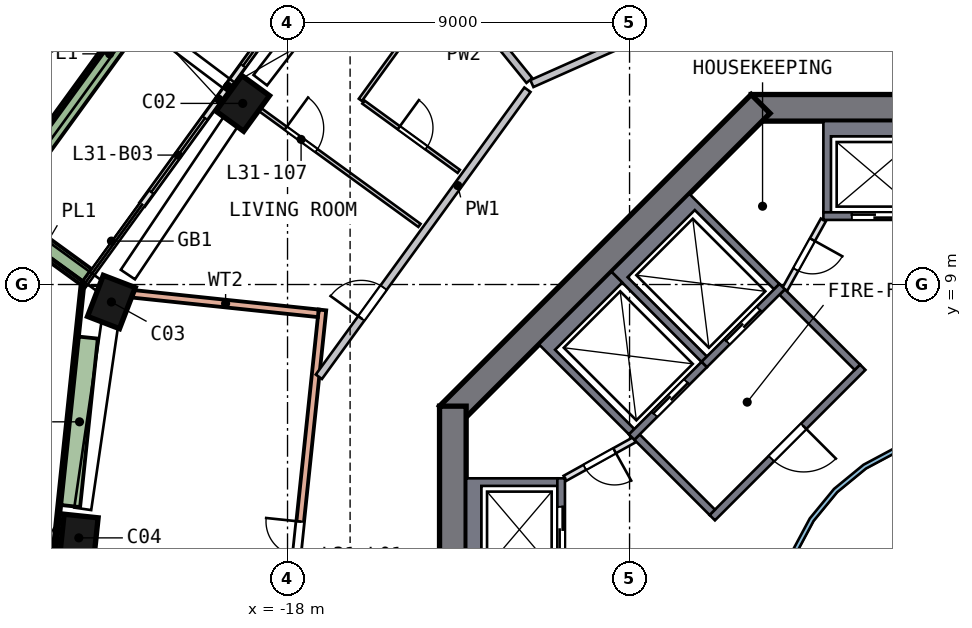
"""IFC4 building model, lengths in metres.
Left out: names, types, materials, properties, quantities, classifications, styles, units other than length and angle.
Written with IfcOpenShell. Run it as: python <this file> out.ifc"""

import sys

from ifc_helpers import new_model, si_unit, direction, frame, frame_2d, origin, origin_2d, place, context, subcontext, project, spatial, polyline, rectangle, outline, extrude, element, fill, save


model = new_model("IFC4")
c1 = context("Model", 3, precision=1e-05, world=origin(), true_north=direction((0.0, 1.0)))
c2 = subcontext(c1, "Body", "Model", "MODEL_VIEW")
j1 = project(units=[si_unit("LENGTHUNIT", "METRE"), si_unit("PLANEANGLEUNIT", "RADIAN")], contexts=[c1])
p1 = place(None, origin())
s1 = spatial("IfcSite", under=j1, at=p1, CompositionType="ELEMENT")
p2 = place(p1, origin())
s2 = spatial("IfcBuilding", under=s1, at=p2, CompositionType="ELEMENT")
p3 = place(p2, frame((0.0, 0.0, 133.0)))
s3 = spatial("IfcBuildingStorey", under=s2, at=p3, CompositionType="ELEMENT", Elevation=133.0)
p4 = place(p3, frame((-19.1, 13.877, 0.0), z_axis=(-0.065251144, -0.091412441, 0.993673012), x_axis=(-0.584148171, -0.803839453, -0.112307833)))
e1 = element("IfcColumn", 1, at=p4, inside=s3, PredefinedType="COLUMN", context=c2, shape_type="SweptSolid", body=[
    extrude(rectangle(XDim=1.15, YDim=0.9, at=origin_2d()), origin(), (0.0, 0.0, 1.0), 3.21),
])
p5 = place(p3, frame((-22.586, 8.67, 0.0), z_axis=(-0.040369992, -0.107729337, 0.993360284), x_axis=(0.356460917, 0.927200738, 0.115040884)))
e2 = element("IfcColumn", 2, at=p5, inside=s3, PredefinedType="COLUMN", context=c2, shape_type="SweptSolid", body=[
    extrude(rectangle(XDim=1.15, YDim=0.9, at=origin_2d()), origin(), (0.0, 0.0, 1.0), 3.211),
])
p6 = place(p3, frame((-23.479, 2.468, 0.0), z_axis=(-0.010799137, -0.111793887, 0.993672736), x_axis=(-0.103931825, -0.98822294, -0.112310274)))
e3 = element("IfcColumn", 3, at=p6, inside=s3, PredefinedType="COLUMN", context=c2, shape_type="SweptSolid", body=[
    extrude(rectangle(XDim=1.15, YDim=0.9, at=origin_2d()), origin(), (0.0, 0.0, 1.0), 3.21),
])
p7 = place(p3, frame((5.799, 13.65, 0.0), z_axis=(0.0, 0.0, 1.0), x_axis=(-1.0, 0.0, 0.0)))
e4 = element("IfcWall", 4, at=p7, inside=s3, PredefinedType="SHEAR", context=c2, shape_type="SweptSolid", body=[
    extrude(rectangle(XDim=11.598, YDim=0.7, at=frame_2d((5.799, 0.0))), origin(), (0.0, 0.0, 1.0), 3.5),
])
p8 = place(p7, frame((4.899, 0.0, 0.0)))
e5 = element("IfcOpeningElement", 5, at=p8, cuts=e4, PredefinedType="OPENING", context=c2, shape_type="SweptSolid", body=[
    extrude(rectangle(XDim=1.8, YDim=2.1, at=frame_2d((0.9, 1.05))), frame((0.0, 0.36, 0.0), z_axis=(0.0, -1.0, 0.0), x_axis=(1.0, 0.0, 0.0)), (0.0, 0.0, 1.0), 0.72),
])
p9 = place(p3, frame((-5.552, 13.752, 0.0), z_axis=(0.0, 0.0, 1.0), x_axis=(-0.707106781, -0.707106781, 0.0)))
e6 = element("IfcWall", 6, at=p9, inside=s3, PredefinedType="SHEAR", context=c2, shape_type="SweptSolid", body=[
    extrude(rectangle(XDim=11.598, YDim=0.7, at=frame_2d((5.799, 0.0))), origin(), (0.0, 0.0, 1.0), 3.5),
])
p10 = place(p3, frame((-13.65, 5.799, 0.0), z_axis=(0.0, 0.0, 1.0), x_axis=(0.0, -1.0, 0.0)))
e7 = element("IfcWall", 7, at=p10, inside=s3, PredefinedType="SHEAR", context=c2, shape_type="SweptSolid", body=[
    extrude(rectangle(XDim=11.598, YDim=0.7, at=frame_2d((5.799, 0.0))), origin(), (0.0, 0.0, 1.0), 3.5),
])
p11 = place(p10, frame((4.899, 0.0, 0.0)))
e8 = element("IfcOpeningElement", 8, at=p11, cuts=e7, PredefinedType="OPENING", context=c2, shape_type="SweptSolid", body=[
    extrude(rectangle(XDim=1.8, YDim=2.1, at=frame_2d((0.9, 1.05))), frame((0.0, 0.36, 0.0), z_axis=(0.0, -1.0, 0.0), x_axis=(1.0, 0.0, 0.0)), (0.0, 0.0, 1.0), 0.72),
])
p12 = place(p3, frame((-17.522, 17.026, 0.0), z_axis=(0.0, 0.0, 1.0), x_axis=(-0.587778943, -0.809021578, 0.0)))
e9 = element("IfcWall", 9, at=p12, inside=s3, PredefinedType="SOLIDWALL", context=c2, shape_type="SweptSolid", body=[
    extrude(rectangle(XDim=3.475, YDim=0.15, at=frame_2d((1.737, 0.0))), origin(), (0.0, 0.0, 1.0), 2.475),
])
p13 = place(p12, frame((0.4, 0.0, 0.0)))
e10 = element("IfcOpeningElement", 10, at=p13, cuts=e9, PredefinedType="OPENING", context=c2, shape_type="SweptSolid", body=[
    extrude(rectangle(XDim=2.4, YDim=2.4, at=frame_2d((1.2, 1.2))), frame((0.0, 0.085, 0.0), z_axis=(0.0, -1.0, 0.0), x_axis=(1.0, 0.0, 0.0)), (0.0, 0.0, 1.0), 0.17),
])
p14 = place(p3, frame((-19.565, 14.215, 0.0), z_axis=(0.0, 0.0, 1.0), x_axis=(-0.58777044, -0.809027756, 0.0)))
e11 = element("IfcWall", 11, at=p14, inside=s3, PredefinedType="SOLIDWALL", context=c2, shape_type="SweptSolid", body=[
    extrude(rectangle(XDim=3.835, YDim=0.15, at=frame_2d((1.918, 0.0))), origin(), (0.0, 0.0, 1.0), 2.475),
])
p15 = place(p14, frame((1.035, 0.0, 0.0)))
e12 = element("IfcOpeningElement", 12, at=p15, cuts=e11, PredefinedType="OPENING", context=c2, shape_type="SweptSolid", body=[
    extrude(rectangle(XDim=2.4, YDim=2.4, at=frame_2d((1.2, 1.2))), frame((0.0, 0.085, 0.0), z_axis=(0.0, -1.0, 0.0), x_axis=(1.0, 0.0, 0.0)), (0.0, 0.0, 1.0), 0.17),
])
p16 = place(p3, frame((-19.532, 19.406, 0.0), z_axis=(0.0, 0.0, 1.0), x_axis=(-0.587777543, -0.809022595, 0.0)))
e13 = element("IfcWall", 13, at=p16, inside=s3, PredefinedType="SOLIDWALL", context=c2, shape_type="SweptSolid", body=[
    extrude(rectangle(XDim=10.719, YDim=0.5, at=frame_2d((5.36, 0.0))), origin(), (0.0, 0.0, 1.0), 0.7),
])
p17 = place(p3, frame((-25.483, 10.789, 0.0), z_axis=(0.0, 0.0, 1.0), x_axis=(0.809025441, -0.587773626, 0.0)))
e14 = element("IfcWall", 14, at=p17, inside=s3, PredefinedType="SOLIDWALL", context=c2, shape_type="SweptSolid", body=[
    extrude(rectangle(XDim=2.699, YDim=0.5, at=frame_2d((1.35, 0.0))), origin(), (0.0, 0.0, 1.0), 0.7),
])
p18 = place(p3, frame((-18.44, -4.598, 0.0), z_axis=(0.0, 0.0, 1.0), x_axis=(0.104530323, 0.9945217, 0.0)))
e15 = element("IfcWall", 15, at=p18, inside=s3, PredefinedType="SOLIDWALL", context=c2, shape_type="SweptSolid", body=[
    extrude(rectangle(XDim=13.0, YDim=0.2, at=frame_2d((6.5, 0.0))), origin(), (0.0, 0.0, 1.0), 3.19),
])
p19 = place(p18, frame((5.6, 0.0, 0.0)))
e16 = element("IfcOpeningElement", 16, at=p19, cuts=e15, PredefinedType="OPENING", context=c2, shape_type="SweptSolid", body=[
    extrude(rectangle(XDim=1.8, YDim=2.4, at=frame_2d((0.9, 1.2))), frame((0.0, 0.11, 0.0), z_axis=(0.0, -1.0, 0.0), x_axis=(1.0, 0.0, 0.0)), (0.0, 0.0, 1.0), 0.22),
])
p20 = place(p3, frame((-22.068, 8.755, 0.0), z_axis=(0.0, 0.0, 1.0), x_axis=(0.994525892, -0.104490432, 0.0)))
e17 = element("IfcWall", 17, at=p20, inside=s3, PredefinedType="SOLIDWALL", context=c2, shape_type="SweptSolid", body=[
    extrude(rectangle(XDim=4.904, YDim=0.2, at=frame_2d((2.452, 0.0))), origin(), (0.0, 0.0, 1.0), 3.19),
])
p21 = place(p3, frame((-23.405, 8.915, 0.0), z_axis=(0.0, 0.0, 1.0), x_axis=(-0.104538298, -0.994520862, 0.0)))
e18 = element("IfcWall", 18, at=p21, inside=s3, PredefinedType="SOLIDWALL", context=c2, shape_type="SweptSolid", body=[
    extrude(rectangle(XDim=12.84, YDim=0.1, at=frame_2d((6.42, 0.0))), origin(), (0.0, 0.0, 1.0), 0.7),
])
p22 = place(p3, frame((-23.241, 7.603, 0.0), z_axis=(0.0, 0.0, 1.0), x_axis=(-0.1045137, -0.994523447, 0.0)))
e19 = element("IfcWall", 19, at=p22, inside=s3, PredefinedType="SOLIDWALL", context=c2, shape_type="SweptSolid", body=[
    extrude(rectangle(XDim=4.457, YDim=0.5, at=frame_2d((2.229, 0.0))), origin(), (0.0, 0.0, 1.0), 0.7),
])
p23 = place(p3, origin())
e20 = element("IfcWall", 20, at=p23, inside=s3, PredefinedType="SOLIDWALL", context=c2, shape_type="SweptSolid", body=[
    extrude(outline(polyline([(-3.9, 10.9), (-3.9, 13.3), (-1.2, 13.3), (-1.2, 10.9), (-1.4, 10.9), (-1.4, 12.9), (-3.7, 12.9), (-3.7, 10.9), (-3.9, 10.9)])), origin(), (0.0, 0.0, 1.0), 3.19),
])
p24 = place(p3, frame((-1.2, 10.8, 0.0), z_axis=(0.0, 0.0, 1.0), x_axis=(-1.0, 0.0, 0.0)))
e21 = element("IfcWall", 21, at=p24, inside=s3, PredefinedType="SOLIDWALL", context=c2, shape_type="SweptSolid", body=[
    extrude(rectangle(XDim=2.7, YDim=0.2, at=frame_2d((1.35, 0.0))), origin(), (0.0, 0.0, 1.0), 3.19),
])
p25 = place(p24, frame((0.75, 0.0, 0.0)))
e22 = element("IfcOpeningElement", 22, at=p25, cuts=e21, PredefinedType="OPENING", context=c2, shape_type="SweptSolid", body=[
    extrude(rectangle(XDim=1.2, YDim=2.1, at=frame_2d((0.6, 1.05))), frame((0.0, 0.11, 0.0), z_axis=(0.0, -1.0, 0.0), x_axis=(1.0, 0.0, 0.0)), (0.0, 0.0, 1.0), 0.22),
])
p26 = place(p3, origin())
e23 = element("IfcWall", 23, at=p26, inside=s3, PredefinedType="SOLIDWALL", context=c2, shape_type="SweptSolid", body=[
    extrude(outline(polyline([(-13.3, 3.9), (-10.9, 3.9), (-10.9, 3.7), (-12.9, 3.7), (-12.9, 1.4), (-10.9, 1.4), (-10.9, 1.2), (-13.3, 1.2), (-13.3, 3.9)])), origin(), (0.0, 0.0, 1.0), 3.19),
])
p27 = place(p3, frame((-10.8, 1.2, 0.0), z_axis=(0.0, 0.0, 1.0), x_axis=(0.0, 1.0, 0.0)))
e24 = element("IfcWall", 24, at=p27, inside=s3, PredefinedType="SOLIDWALL", context=c2, shape_type="SweptSolid", body=[
    extrude(rectangle(XDim=2.7, YDim=0.2, at=frame_2d((1.35, 0.0))), origin(), (0.0, 0.0, 1.0), 3.19),
])
p28 = place(p27, frame((0.75, 0.0, 0.0)))
e25 = element("IfcOpeningElement", 25, at=p28, cuts=e24, PredefinedType="OPENING", context=c2, shape_type="SweptSolid", body=[
    extrude(rectangle(XDim=1.2, YDim=2.1, at=frame_2d((0.6, 1.05))), frame((0.0, 0.11, 0.0), z_axis=(0.0, -1.0, 0.0), x_axis=(1.0, 0.0, 0.0)), (0.0, 0.0, 1.0), 0.22),
])
p29 = place(p3, origin())
e26 = element("IfcWall", 26, at=p29, inside=s3, PredefinedType="SOLIDWALL", context=c2, shape_type="SweptSolid", body=[
    extrude(outline(polyline([(-9.475, 9.334), (-7.425, 11.385), (-5.056, 9.016), (-5.197, 8.874), (-7.283, 10.96), (-9.051, 9.192), (-6.965, 7.106), (-7.106, 6.965), (-9.475, 9.334)])), origin(), (0.0, 0.0, 1.0), 3.19),
])
p30 = place(p3, frame((-4.985, 8.945, 0.0), z_axis=(0.0, 0.0, 1.0), x_axis=(-0.707106781, -0.707106781, 0.0)))
e27 = element("IfcWall", 27, at=p30, inside=s3, PredefinedType="SOLIDWALL", context=c2, shape_type="SweptSolid", body=[
    extrude(rectangle(XDim=2.9, YDim=0.2, at=frame_2d((1.45, 0.0))), origin(), (0.0, 0.0, 1.0), 3.19),
])
p31 = place(p30, frame((0.85, 0.0, 0.0)))
e28 = element("IfcOpeningElement", 28, at=p31, cuts=e27, PredefinedType="OPENING", context=c2, shape_type="SweptSolid", body=[
    extrude(rectangle(XDim=1.2, YDim=2.1, at=frame_2d((0.6, 1.05))), frame((0.0, 0.11, 0.0), z_axis=(0.0, -1.0, 0.0), x_axis=(1.0, 0.0, 0.0)), (0.0, 0.0, 1.0), 0.22),
])
p32 = place(p3, origin())
e29 = element("IfcWall", 29, at=p32, inside=s3, PredefinedType="SOLIDWALL", context=c2, shape_type="SweptSolid", body=[
    extrude(outline(polyline([(-11.385, 7.425), (-9.475, 9.334), (-9.192, 9.051), (-10.96, 7.283), (-8.874, 5.197), (-9.016, 5.056), (-11.385, 7.425)])), origin(), (0.0, 0.0, 1.0), 3.19),
])
p33 = place(p3, frame((-7.036, 6.894, 0.0), z_axis=(0.0, 0.0, 1.0), x_axis=(-0.707106781, -0.707106781, 0.0)))
e30 = element("IfcWall", 30, at=p33, inside=s3, PredefinedType="SOLIDWALL", context=c2, shape_type="SweptSolid", body=[
    extrude(rectangle(XDim=2.7, YDim=0.2, at=frame_2d((1.35, 0.0))), origin(), (0.0, 0.0, 1.0), 3.19),
])
p34 = place(p33, frame((0.65, 0.0, 0.0)))
e31 = element("IfcOpeningElement", 31, at=p34, cuts=e30, PredefinedType="OPENING", context=c2, shape_type="SweptSolid", body=[
    extrude(rectangle(XDim=1.2, YDim=2.1, at=frame_2d((0.6, 1.05))), frame((0.0, 0.11, 0.0), z_axis=(0.0, -1.0, 0.0), x_axis=(1.0, 0.0, 0.0)), (0.0, 0.0, 1.0), 0.22),
])
p35 = place(p3, frame((-2.864, 6.823, 0.0), z_axis=(0.0, 0.0, 1.0), x_axis=(-0.707106781, -0.707106781, 0.0)))
e32 = element("IfcWall", 32, at=p35, inside=s3, PredefinedType="SOLIDWALL", context=c2, shape_type="SweptSolid", body=[
    extrude(rectangle(XDim=5.6, YDim=0.2, at=frame_2d((2.8, 0.0))), origin(), (0.0, 0.0, 1.0), 3.19),
])
p36 = place(p35, frame((2.2, 0.0, 0.0)))
e33 = element("IfcOpeningElement", 33, at=p36, cuts=e32, PredefinedType="OPENING", context=c2, shape_type="SweptSolid", body=[
    extrude(rectangle(XDim=1.2, YDim=2.1, at=frame_2d((0.6, 1.05))), frame((0.0, 0.11, 0.0), z_axis=(0.0, -1.0, 0.0), x_axis=(1.0, 0.0, 0.0)), (0.0, 0.0, 1.0), 0.22),
])
for number, where, z_axis, x_axis in (
    (34, (-3.005, 6.823, 0.0), (0.0, 0.0, 1.0), (-0.707, 0.707, 0.0)),
    (35, (-6.823, 3.005, 0.0), (0.0, 0.0, 1.0), (-0.707, 0.707, 0.0)),
):
    element("IfcWall", number, at=place(p3, frame(where, z_axis=z_axis, x_axis=x_axis)), inside=s3, PredefinedType="SOLIDWALL", context=c2, shape_type="SweptSolid", body=[
        extrude(rectangle(XDim=2.8, YDim=0.2, at=frame_2d((1.4, 0.0))), origin(), (0.0, 0.0, 1.0), 3.19),
    ])
p37 = place(p3, frame((-3.9, 10.7, 0.0), z_axis=(0.0, 0.0, 1.0), x_axis=(-0.485692555, -0.874129705, 0.0)))
e36 = element("IfcWall", 36, at=p37, inside=s3, PredefinedType="PARTITIONING", context=c2, shape_type="SweptSolid", body=[
    extrude(rectangle(XDim=2.089, YDim=0.15, at=frame_2d((1.044, 0.0))), origin(), (0.0, 0.0, 1.0), 3.19),
])
p38 = place(p37, frame((0.594, 0.0, 0.0)))
e37 = element("IfcOpeningElement", 37, at=p38, cuts=e36, PredefinedType="OPENING", context=c2, shape_type="SweptSolid", body=[
    extrude(rectangle(XDim=0.9, YDim=2.1, at=frame_2d((0.45, 1.05))), frame((0.0, 0.085, 0.0), z_axis=(0.0, -1.0, 0.0), x_axis=(1.0, 0.0, 0.0)), (0.0, 0.0, 1.0), 0.17),
])
p39 = place(p3, frame((-8.874, 4.914, 0.0), z_axis=(0.0, 0.0, 1.0), x_axis=(-0.874129705, -0.485692555, 0.0)))
e38 = element("IfcWall", 38, at=p39, inside=s3, PredefinedType="PARTITIONING", context=c2, shape_type="SweptSolid", body=[
    extrude(rectangle(XDim=2.089, YDim=0.15, at=frame_2d((1.044, 0.0))), origin(), (0.0, 0.0, 1.0), 3.19),
])
p40 = place(p39, frame((0.594, 0.0, 0.0)))
e39 = element("IfcOpeningElement", 39, at=p40, cuts=e38, PredefinedType="OPENING", context=c2, shape_type="SweptSolid", body=[
    extrude(rectangle(XDim=0.9, YDim=2.1, at=frame_2d((0.45, 1.05))), frame((0.0, 0.085, 0.0), z_axis=(0.0, -1.0, 0.0), x_axis=(1.0, 0.0, 0.0)), (0.0, 0.0, 1.0), 0.17),
])
p41 = place(p3, origin())
e40 = element("IfcWall", 40, at=p41, inside=s3, PredefinedType="SOLIDWALL", context=c2, shape_type="SweptSolid", body=[
    extrude(outline(polyline([(5.021, -0.999), (4.73, -1.959), (4.257, -2.844), (3.62, -3.62), (2.844, -4.257), (1.959, -4.73), (0.999, -5.021), (0.0, -5.12), (-0.999, -5.021), (-1.959, -4.73), (-2.844, -4.257), (-3.62, -3.62), (-4.257, -2.844), (-4.73, -1.959), (-5.021, -0.999), (-5.12, 0.0), (-5.021, 0.999), (-4.73, 1.959), (-4.257, 2.844), (-3.62, 3.62), (-2.844, 4.257), (-1.959, 4.73), (-0.999, 5.021), (0.0, 5.12), (0.999, 5.021), (1.959, 4.73), (2.844, 4.257), (3.62, 3.62), (4.257, 2.844), (4.73, 1.959), (5.021, 0.999), (5.12, 0.0), (5.021, -0.999)]), holes=[polyline([(4.904, 0.976), (4.619, 1.913), (4.157, 2.778), (3.535, 3.535), (2.778, 4.157), (1.913, 4.619), (0.976, 4.904), (0.0, 5.0), (-0.976, 4.904), (-1.913, 4.619), (-2.778, 4.157), (-3.535, 3.535), (-4.157, 2.778), (-4.619, 1.913), (-4.904, 0.976), (-5.0, 0.0), (-4.904, -0.976), (-4.619, -1.913), (-4.157, -2.778), (-3.535, -3.535), (-2.778, -4.157), (-1.913, -4.619), (-0.976, -4.904), (0.0, -5.0), (0.976, -4.904), (1.913, -4.619), (2.778, -4.157), (3.535, -3.535), (4.157, -2.778), (4.619, -1.913), (4.904, -0.976), (5.0, 0.0), (4.904, 0.976)])]), origin(), (0.0, 0.0, 1.0), 3.19),
])
p42 = place(p3, frame((-17.175, 6.572, 0.0), z_axis=(0.0, 0.0, 1.0), x_axis=(0.587764273, 0.809032236, 0.0)))
e41 = element("IfcWall", 41, at=p42, inside=s3, PredefinedType="SOLIDWALL", context=c2, shape_type="SweptSolid", body=[
    extrude(rectangle(XDim=9.337, YDim=0.2, at=frame_2d((4.668, 0.0))), origin(), (0.0, 0.0, 1.0), 3.19),
])
p43 = place(p42, frame((1.9, 0.0, 0.0)))
e42 = element("IfcOpeningElement", 42, at=p43, cuts=e41, PredefinedType="OPENING", context=c2, shape_type="SweptSolid", body=[
    extrude(rectangle(XDim=1.0, YDim=2.1, at=frame_2d((0.5, 1.05))), frame((0.0, 0.11, 0.0), z_axis=(0.0, -1.0, 0.0), x_axis=(1.0, 0.0, 0.0)), (0.0, 0.0, 1.0), 0.22),
])
p44 = place(p3, frame((-8.411, 15.694, 0.0), z_axis=(0.0, 0.0, 1.0), x_axis=(-0.913526024, -0.40678029, 0.0)))
e43 = element("IfcWall", 43, at=p44, inside=s3, PredefinedType="SOLIDWALL", context=c2, shape_type="SweptSolid", body=[
    extrude(rectangle(XDim=3.458, YDim=0.2, at=frame_2d((1.729, 0.0))), origin(), (0.0, 0.0, 1.0), 3.19),
])
p45 = place(p3, frame((-11.635, 14.368, 0.0), z_axis=(0.0, 0.0, 1.0), x_axis=(-0.629352307, 0.777120115, 0.0)))
e44 = element("IfcWall", 44, at=p45, inside=s3, PredefinedType="SOLIDWALL", context=c2, shape_type="SweptSolid", body=[
    extrude(rectangle(XDim=3.418, YDim=0.2, at=frame_2d((1.709, 0.0))), origin(), (0.0, 0.0, 1.0), 3.19),
])
p46 = place(p3, frame((-19.504, 14.17, 0.0), z_axis=(0.0, 0.0, 1.0), x_axis=(0.809020962, -0.587779791, 0.0)))
e45 = element("IfcWall", 45, at=p46, inside=s3, PredefinedType="PARTITIONING", context=c2, shape_type="SweptSolid", body=[
    extrude(rectangle(XDim=6.15, YDim=0.1, at=frame_2d((3.075, 0.0))), origin(), (0.0, 0.0, 1.0), 3.19),
])
p47 = place(p46, frame((1.8, 0.0, 0.0)))
e46 = element("IfcOpeningElement", 46, at=p47, cuts=e45, PredefinedType="OPENING", context=c2, shape_type="SweptSolid", body=[
    extrude(rectangle(XDim=1.0, YDim=2.1, at=frame_2d((0.5, 1.05))), frame((0.0, 0.06, 0.0), z_axis=(0.0, -1.0, 0.0), x_axis=(1.0, 0.0, 0.0)), (0.0, 0.0, 1.0), 0.12),
])
p48 = place(p3, frame((-13.907, 16.856, 0.0), z_axis=(0.0, 0.0, 1.0), x_axis=(-0.587803242, -0.809003924, 0.0)))
e47 = element("IfcWall", 47, at=p48, inside=s3, PredefinedType="PARTITIONING", context=c2, shape_type="SweptSolid", body=[
    extrude(rectangle(XDim=3.704, YDim=0.1, at=frame_2d((1.852, 0.0))), origin(), (0.0, 0.0, 1.0), 3.19),
])
p49 = place(p3, frame((-16.003, 13.8, 0.0), z_axis=(0.0, 0.0, 1.0), x_axis=(0.809018674, -0.58778294, 0.0)))
e48 = element("IfcWall", 48, at=p49, inside=s3, PredefinedType="PARTITIONING", context=c2, shape_type="SweptSolid", body=[
    extrude(rectangle(XDim=3.1, YDim=0.1, at=frame_2d((1.55, 0.0))), origin(), (0.0, 0.0, 1.0), 3.19),
])
p50 = place(p49, frame((1.15, 0.0, 0.0)))
e49 = element("IfcOpeningElement", 49, at=p50, cuts=e48, PredefinedType="OPENING", context=c2, shape_type="SweptSolid", body=[
    extrude(rectangle(XDim=0.9, YDim=2.1, at=frame_2d((0.45, 1.05))), frame((0.0, 0.06, 0.0), z_axis=(0.0, -1.0, 0.0), x_axis=(1.0, 0.0, 0.0)), (0.0, 0.0, 1.0), 0.12),
])
p51 = place(p13, origin())
e50 = element("IfcDoor", 50, at=p51, inside=s3, OperationType="SLIDING_TO_RIGHT", PredefinedType="DOOR", context=c2, shape_type="SweptSolid", body=[
    extrude(rectangle(XDim=2.4, YDim=2.4, at=frame_2d((1.2, 1.2))), frame((0.0, 0.025, 0.0), z_axis=(0.0, -1.0, 0.0), x_axis=(1.0, 0.0, 0.0)), (0.0, 0.0, 1.0), 0.05),
])
fill(e10, e50)
p52 = place(p15, origin())
e51 = element("IfcDoor", 51, at=p52, inside=s3, OperationType="SLIDING_TO_LEFT", PredefinedType="DOOR", context=c2, shape_type="SweptSolid", body=[
    extrude(rectangle(XDim=2.4, YDim=2.4, at=frame_2d((1.2, 1.2))), frame((0.0, 0.025, 0.0), z_axis=(0.0, -1.0, 0.0), x_axis=(1.0, 0.0, 0.0)), (0.0, 0.0, 1.0), 0.05),
])
fill(e12, e51)
p53 = place(p19, origin())
e52 = element("IfcDoor", 52, at=p53, inside=s3, OperationType="DOUBLE_DOOR_SINGLE_SWING", PredefinedType="DOOR", context=c2, shape_type="SweptSolid", body=[
    extrude(rectangle(XDim=1.8, YDim=2.4, at=frame_2d((0.9, 1.2))), frame((0.0, 0.025, 0.0), z_axis=(0.0, -1.0, 0.0), x_axis=(1.0, 0.0, 0.0)), (0.0, 0.0, 1.0), 0.05),
])
fill(e16, e52)
p54 = place(p25, origin())
e53 = element("IfcDoor", 53, at=p54, inside=s3, OperationType="DOUBLE_DOOR_SLIDING", PredefinedType="DOOR", context=c2, shape_type="SweptSolid", body=[
    extrude(rectangle(XDim=1.2, YDim=2.1, at=frame_2d((0.6, 1.05))), frame((0.0, 0.025, 0.0), z_axis=(0.0, -1.0, 0.0), x_axis=(1.0, 0.0, 0.0)), (0.0, 0.0, 1.0), 0.05),
])
fill(e22, e53)
p55 = place(p28, origin())
e54 = element("IfcDoor", 54, at=p55, inside=s3, OperationType="DOUBLE_DOOR_SLIDING", PredefinedType="DOOR", context=c2, shape_type="SweptSolid", body=[
    extrude(rectangle(XDim=1.2, YDim=2.1, at=frame_2d((0.6, 1.05))), frame((0.0, 0.025, 0.0), z_axis=(0.0, -1.0, 0.0), x_axis=(1.0, 0.0, 0.0)), (0.0, 0.0, 1.0), 0.05),
])
fill(e25, e54)
p56 = place(p31, origin())
e55 = element("IfcDoor", 55, at=p56, inside=s3, OperationType="DOUBLE_DOOR_SLIDING", PredefinedType="DOOR", context=c2, shape_type="SweptSolid", body=[
    extrude(rectangle(XDim=1.2, YDim=2.1, at=frame_2d((0.6, 1.05))), frame((0.0, 0.025, 0.0), z_axis=(0.0, -1.0, 0.0), x_axis=(1.0, 0.0, 0.0)), (0.0, 0.0, 1.0), 0.05),
])
fill(e28, e55)
p57 = place(p34, origin())
e56 = element("IfcDoor", 56, at=p57, inside=s3, OperationType="DOUBLE_DOOR_SLIDING", PredefinedType="DOOR", context=c2, shape_type="SweptSolid", body=[
    extrude(rectangle(XDim=1.2, YDim=2.1, at=frame_2d((0.6, 1.05))), frame((0.0, 0.025, 0.0), z_axis=(0.0, -1.0, 0.0), x_axis=(1.0, 0.0, 0.0)), (0.0, 0.0, 1.0), 0.05),
])
fill(e31, e56)
p58 = place(p36, origin())
e57 = element("IfcDoor", 57, at=p58, inside=s3, OperationType="SINGLE_SWING_LEFT", PredefinedType="DOOR", context=c2, shape_type="SweptSolid", body=[
    extrude(rectangle(XDim=1.2, YDim=2.1, at=frame_2d((0.6, 1.05))), frame((0.0, 0.025, 0.0), z_axis=(0.0, -1.0, 0.0), x_axis=(1.0, 0.0, 0.0)), (0.0, 0.0, 1.0), 0.05),
])
fill(e33, e57)
p59 = place(p38, origin())
e58 = element("IfcDoor", 58, at=p59, inside=s3, OperationType="SINGLE_SWING_LEFT", PredefinedType="DOOR", context=c2, shape_type="SweptSolid", body=[
    extrude(rectangle(XDim=0.9, YDim=2.1, at=frame_2d((0.45, 1.05))), frame((0.0, 0.025, 0.0), z_axis=(0.0, -1.0, 0.0), x_axis=(1.0, 0.0, 0.0)), (0.0, 0.0, 1.0), 0.05),
])
fill(e37, e58)
p60 = place(p40, origin())
e59 = element("IfcDoor", 59, at=p60, inside=s3, OperationType="SINGLE_SWING_LEFT", PredefinedType="DOOR", context=c2, shape_type="SweptSolid", body=[
    extrude(rectangle(XDim=0.9, YDim=2.1, at=frame_2d((0.45, 1.05))), frame((0.0, 0.025, 0.0), z_axis=(0.0, -1.0, 0.0), x_axis=(1.0, 0.0, 0.0)), (0.0, 0.0, 1.0), 0.05),
])
fill(e39, e59)
p61 = place(p43, origin())
e60 = element("IfcDoor", 60, at=p61, inside=s3, OperationType="SINGLE_SWING_LEFT", PredefinedType="DOOR", context=c2, shape_type="SweptSolid", body=[
    extrude(rectangle(XDim=1.0, YDim=2.1, at=frame_2d((0.5, 1.05))), frame((0.0, 0.025, 0.0), z_axis=(0.0, -1.0, 0.0), x_axis=(1.0, 0.0, 0.0)), (0.0, 0.0, 1.0), 0.05),
])
fill(e42, e60)
p62 = place(p47, origin())
e61 = element("IfcDoor", 61, at=p62, inside=s3, OperationType="SINGLE_SWING_LEFT", PredefinedType="DOOR", context=c2, shape_type="SweptSolid", body=[
    extrude(rectangle(XDim=1.0, YDim=2.1, at=frame_2d((0.5, 1.05))), frame((0.0, 0.025, 0.0), z_axis=(0.0, -1.0, 0.0), x_axis=(1.0, 0.0, 0.0)), (0.0, 0.0, 1.0), 0.05),
])
fill(e46, e61)
p63 = place(p50, origin())
e62 = element("IfcDoor", 62, at=p63, inside=s3, OperationType="SINGLE_SWING_LEFT", PredefinedType="DOOR", context=c2, shape_type="SweptSolid", body=[
    extrude(rectangle(XDim=0.9, YDim=2.1, at=frame_2d((0.45, 1.05))), frame((0.0, 0.025, 0.0), z_axis=(0.0, -1.0, 0.0), x_axis=(1.0, 0.0, 0.0)), (0.0, 0.0, 1.0), 0.05),
])
fill(e49, e62)
save(model, sys.argv[1])
